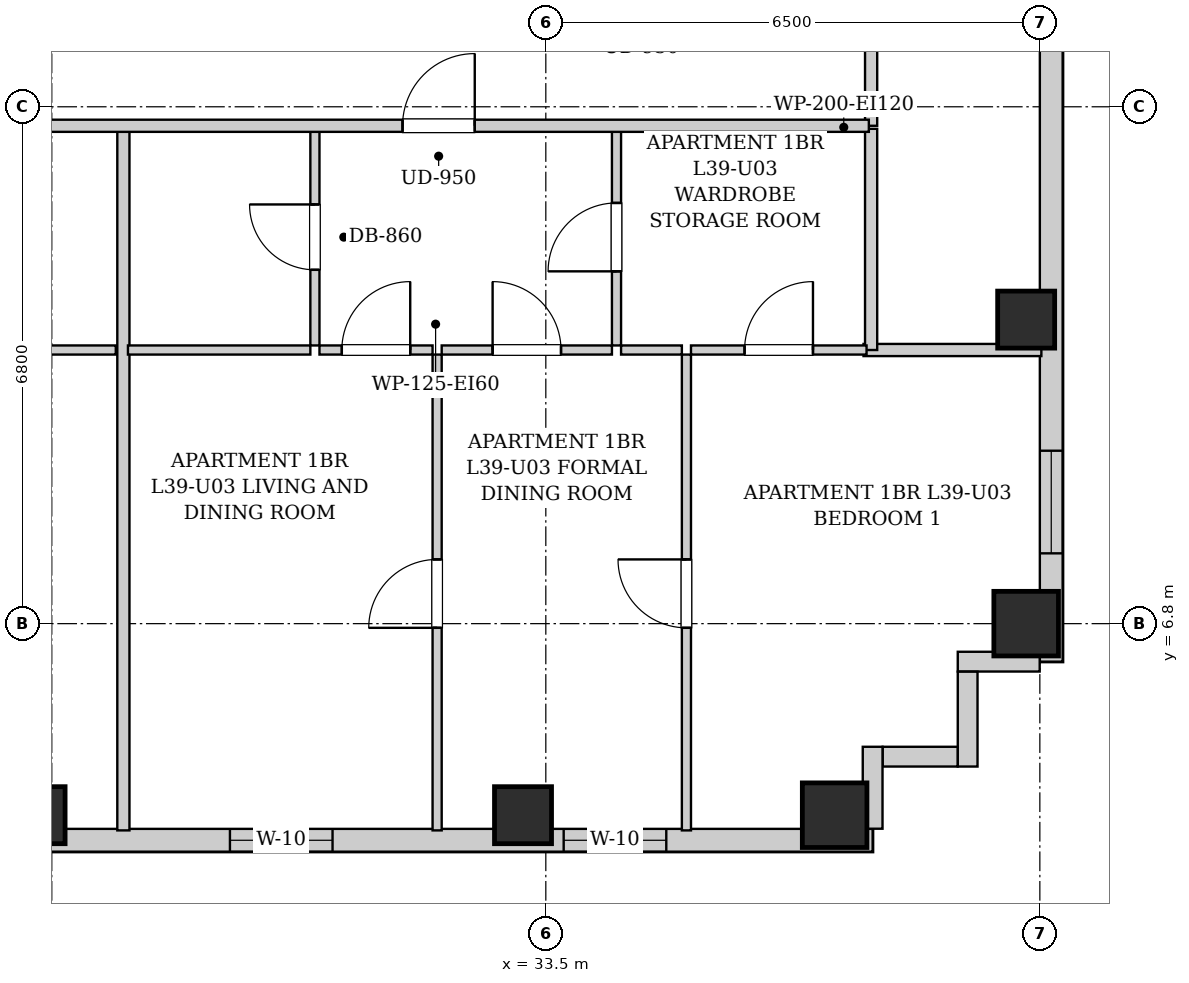
"""IFC4 building model, lengths in metres.
Left out: names, types, materials, properties, quantities, classifications, styles, units other than length and angle.
Written with IfcOpenShell. Run it as: python <this file> out.ifc"""

import sys

from ifc_helpers import new_model, si_unit, direction, frame, frame_2d, origin, origin_2d, place, context, subcontext, project, spatial, rectangle, extrude, element, fill, save


model = new_model("IFC4")
c1 = context("Model", 3, precision=1e-05, world=origin(), true_north=direction((0.0, 1.0)))
c2 = subcontext(c1, "Body", "Model", "MODEL_VIEW")
j1 = project(units=[si_unit("LENGTHUNIT", "METRE"), si_unit("PLANEANGLEUNIT", "RADIAN")], contexts=[c1])
p1 = place(None, origin())
s1 = spatial("IfcSite", under=j1, at=p1, CompositionType="ELEMENT")
p2 = place(p1, origin())
s2 = spatial("IfcBuilding", under=s1, at=p2, CompositionType="ELEMENT")
p3 = place(p2, frame((0.0, 0.0, 137.4)))
s3 = spatial("IfcBuildingStorey", under=s2, at=p3, CompositionType="ELEMENT", Elevation=137.4)
for number, where, z_axis, x_axis in (
    (1, (26.8, 4.28, 0.0), (0.0, 0.0, 1.0), (1.0, 0.0, 0.0)),
    (2, (33.2, 4.28, 0.0), (0.0, 0.0, 1.0), (1.0, 0.0, 0.0)),
):
    element("IfcColumn", number, at=place(p3, frame(where, z_axis=z_axis, x_axis=x_axis)), inside=s3, PredefinedType="COLUMN", context=c2, shape_type="SweptSolid", body=[
        extrude(rectangle(XDim=0.75, YDim=0.75, at=origin_2d()), origin(), (0.0, 0.0, 1.0), 3.25),
    ])
for number, where, z_axis, x_axis in (
    (3, (37.3, 4.28, 0.0), (0.0, 0.0, 1.0), (1.0, 0.0, 0.0)),
    (4, (39.82, 6.8, 0.0), (0.0, 0.0, 1.0), (1.0, 0.0, 0.0)),
):
    element("IfcColumn", number, at=place(p3, frame(where, z_axis=z_axis, x_axis=x_axis)), inside=s3, PredefinedType="COLUMN", context=c2, shape_type="SweptSolid", body=[
        extrude(rectangle(XDim=0.85, YDim=0.85, at=origin_2d()), origin(), (0.0, 0.0, 1.0), 3.25),
    ])
p4 = place(p3, frame((39.82, 10.8, 0.0), z_axis=(0.0, 0.0, 1.0), x_axis=(1.0, 0.0, 0.0)))
e5 = element("IfcColumn", 5, at=p4, inside=s3, PredefinedType="COLUMN", context=c2, shape_type="SweptSolid", body=[
    extrude(rectangle(XDim=0.75, YDim=0.75, at=origin_2d()), origin(), (0.0, 0.0, 1.0), 3.25),
])
p5 = place(p3, frame((40.15, 40.8, 0.0), z_axis=(0.0, 0.0, 1.0), x_axis=(0.0, -1.0, 0.0)))
e6 = element("IfcWall", 6, at=p5, inside=s3, PredefinedType="SOLIDWALL", context=c2, shape_type="SweptSolid", body=[
    extrude(rectangle(XDim=34.5, YDim=0.3, at=frame_2d((17.25, 0.0))), origin(), (0.0, 0.0, 1.0), 2.99),
])
p6 = place(p5, frame((31.725, 0.0, 0.55)))
e7 = element("IfcOpeningElement", 7, at=p6, cuts=e6, PredefinedType="OPENING", context=c2, shape_type="SweptSolid", body=[
    extrude(rectangle(XDim=1.35, YDim=1.2, at=frame_2d((0.675, 0.6))), frame((0.0, 0.16, 0.0), z_axis=(0.0, -1.0, 0.0), x_axis=(1.0, 0.0, 0.0)), (0.0, 0.0, 1.0), 0.32),
])
p7 = place(p5, frame((3.0, 0.0, 0.55)))
e8 = element("IfcOpeningElement", 8, at=p7, cuts=e6, PredefinedType="OPENING", context=c2, shape_type="SweptSolid", body=[
    extrude(rectangle(XDim=1.35, YDim=1.2, at=frame_2d((0.675, 0.6))), frame((0.0, 0.16, 0.0), z_axis=(0.0, -1.0, 0.0), x_axis=(1.0, 0.0, 0.0)), (0.0, 0.0, 1.0), 0.32),
])
p8 = place(p5, frame((1.085, 0.0, 0.55)))
e9 = element("IfcOpeningElement", 9, at=p8, cuts=e6, PredefinedType="OPENING", context=c2, shape_type="SweptSolid", body=[
    extrude(rectangle(XDim=1.35, YDim=1.2, at=frame_2d((0.675, 0.6))), frame((0.0, 0.16, 0.0), z_axis=(0.0, -1.0, 0.0), x_axis=(1.0, 0.0, 0.0)), (0.0, 0.0, 1.0), 0.32),
])
p9 = place(p5, frame((21.3, 0.0, 0.55)))
e10 = element("IfcOpeningElement", 10, at=p9, cuts=e6, PredefinedType="OPENING", context=c2, shape_type="SweptSolid", body=[
    extrude(rectangle(XDim=1.35, YDim=1.2, at=frame_2d((0.675, 0.6))), frame((0.0, 0.16, 0.0), z_axis=(0.0, -1.0, 0.0), x_axis=(1.0, 0.0, 0.0)), (0.0, 0.0, 1.0), 0.32),
])
p10 = place(p5, frame((22.91, 0.0, 0.55)))
e11 = element("IfcOpeningElement", 11, at=p10, cuts=e6, PredefinedType="OPENING", context=c2, shape_type="SweptSolid", body=[
    extrude(rectangle(XDim=1.35, YDim=1.2, at=frame_2d((0.675, 0.6))), frame((0.0, 0.16, 0.0), z_axis=(0.0, -1.0, 0.0), x_axis=(1.0, 0.0, 0.0)), (0.0, 0.0, 1.0), 0.32),
])
p11 = place(p5, frame((14.175, 0.0, 0.55)))
e12 = element("IfcOpeningElement", 12, at=p11, cuts=e6, PredefinedType="OPENING", context=c2, shape_type="SweptSolid", body=[
    extrude(rectangle(XDim=1.35, YDim=1.2, at=frame_2d((0.675, 0.6))), frame((0.0, 0.16, 0.0), z_axis=(0.0, -1.0, 0.0), x_axis=(1.0, 0.0, 0.0)), (0.0, 0.0, 1.0), 0.32),
])
p12 = place(p5, frame((12.335, 0.0, 0.55)))
e13 = element("IfcOpeningElement", 13, at=p12, cuts=e6, PredefinedType="OPENING", context=c2, shape_type="SweptSolid", body=[
    extrude(rectangle(XDim=1.35, YDim=1.2, at=frame_2d((0.675, 0.6))), frame((0.0, 0.16, 0.0), z_axis=(0.0, -1.0, 0.0), x_axis=(1.0, 0.0, 0.0)), (0.0, 0.0, 1.0), 0.32),
])
p13 = place(p3, frame((37.8, 3.95, 0.0), z_axis=(0.0, 0.0, 1.0), x_axis=(-1.0, 0.0, 0.0)))
e14 = element("IfcWall", 14, at=p13, inside=s3, PredefinedType="SOLIDWALL", context=c2, shape_type="SweptSolid", body=[
    extrude(rectangle(XDim=20.7, YDim=0.3, at=frame_2d((10.35, 0.0))), origin(), (0.0, 0.0, 1.0), 2.99),
])
p14 = place(p13, frame((17.305, 0.0, 0.55)))
e15 = element("IfcOpeningElement", 15, at=p14, cuts=e14, PredefinedType="OPENING", context=c2, shape_type="SweptSolid", body=[
    extrude(rectangle(XDim=1.35, YDim=1.2, at=frame_2d((0.675, 0.6))), frame((0.0, 0.16, 0.0), z_axis=(0.0, -1.0, 0.0), x_axis=(1.0, 0.0, 0.0)), (0.0, 0.0, 1.0), 0.32),
])
p15 = place(p13, frame((7.106, 0.0, 0.55)))
e16 = element("IfcOpeningElement", 16, at=p15, cuts=e14, PredefinedType="OPENING", context=c2, shape_type="SweptSolid", body=[
    extrude(rectangle(XDim=1.35, YDim=1.2, at=frame_2d((0.675, 0.6))), frame((0.0, 0.16, 0.0), z_axis=(0.0, -1.0, 0.0), x_axis=(1.0, 0.0, 0.0)), (0.0, 0.0, 1.0), 0.32),
])
p16 = place(p13, frame((2.715, 0.0, 0.55)))
e17 = element("IfcOpeningElement", 17, at=p16, cuts=e14, PredefinedType="OPENING", context=c2, shape_type="SweptSolid", body=[
    extrude(rectangle(XDim=1.35, YDim=1.2, at=frame_2d((0.675, 0.6))), frame((0.0, 0.16, 0.0), z_axis=(0.0, -1.0, 0.0), x_axis=(1.0, 0.0, 0.0)), (0.0, 0.0, 1.0), 0.32),
])
p17 = place(p3, frame((39.998, 6.3, 0.0), z_axis=(0.0, 0.0, 1.0), x_axis=(-1.0, 0.0, 0.0)))
e18 = element("IfcWall", 18, at=p17, inside=s3, PredefinedType="SOLIDWALL", context=c2, shape_type="SweptSolid", body=[
    extrude(rectangle(XDim=1.078, YDim=0.26, at=frame_2d((0.539, 0.0))), origin(), (0.0, 0.0, 1.0), 2.99),
])
p18 = place(p3, frame((39.05, 6.168, 0.0), z_axis=(0.0, 0.0, 1.0), x_axis=(0.0, -1.0, 0.0)))
e19 = element("IfcWall", 19, at=p18, inside=s3, PredefinedType="SOLIDWALL", context=c2, shape_type="SweptSolid", body=[
    extrude(rectangle(XDim=1.248, YDim=0.26, at=frame_2d((0.624, 0.0))), origin(), (0.0, 0.0, 1.0), 2.99),
])
p19 = place(p3, frame((38.918, 5.05, 0.0), z_axis=(0.0, 0.0, 1.0), x_axis=(-1.0, 0.0, 0.0)))
e20 = element("IfcWall", 20, at=p19, inside=s3, PredefinedType="SOLIDWALL", context=c2, shape_type="SweptSolid", body=[
    extrude(rectangle(XDim=0.986, YDim=0.26, at=frame_2d((0.493, 0.0))), origin(), (0.0, 0.0, 1.0), 2.99),
])
p20 = place(p3, frame((37.8, 5.18, 0.0), z_axis=(0.0, 0.0, 1.0), x_axis=(0.0, -1.0, 0.0)))
e21 = element("IfcWall", 21, at=p20, inside=s3, PredefinedType="SOLIDWALL", context=c2, shape_type="SweptSolid", body=[
    extrude(rectangle(XDim=1.078, YDim=0.26, at=frame_2d((0.539, 0.0))), origin(), (0.0, 0.0, 1.0), 2.99),
])
p21 = place(p3, frame((37.78, 13.35, 0.0), z_axis=(0.0, 0.0, 1.0), x_axis=(0.0, 1.0, 0.0)))
e22 = element("IfcWall", 22, at=p21, inside=s3, PredefinedType="PARTITIONING", context=c2, shape_type="SweptSolid", body=[
    extrude(rectangle(XDim=1.74, YDim=0.16, at=frame_2d((0.87, 0.0))), origin(), (0.0, 0.0, 1.0), 2.99),
])
p22 = place(p3, frame((23.938, 10.4, 0.0), z_axis=(0.0, 0.0, 1.0), x_axis=(1.0, 0.0, 0.0)))
e23 = element("IfcWall", 23, at=p22, inside=s3, PredefinedType="PARTITIONING", context=c2, shape_type="SweptSolid", body=[
    extrude(rectangle(XDim=3.904, YDim=0.12, at=frame_2d((1.952, 0.0))), origin(), (0.0, 0.0, 1.0), 2.99),
])
p23 = place(p22, frame((1.502, 0.0, 0.0)))
e24 = element("IfcOpeningElement", 24, at=p23, cuts=e23, PredefinedType="OPENING", context=c2, shape_type="SweptSolid", body=[
    extrude(rectangle(XDim=0.9, YDim=2.05, at=frame_2d((0.45, 1.025))), frame((0.0, 0.07, 0.0), z_axis=(0.0, -1.0, 0.0), x_axis=(1.0, 0.0, 0.0)), (0.0, 0.0, 1.0), 0.14),
])
p24 = place(p3, frame((37.68, 10.4, 0.0), z_axis=(0.0, 0.0, 1.0), x_axis=(1.0, 0.0, 0.0)))
e25 = element("IfcWall", 25, at=p24, inside=s3, PredefinedType="PARTITIONING", context=c2, shape_type="SweptSolid", body=[
    extrude(rectangle(XDim=2.34, YDim=0.16, at=frame_2d((1.17, 0.0))), origin(), (0.0, 0.0, 1.0), 2.99),
])
p25 = place(p3, frame((37.78, 10.4, 0.0), z_axis=(0.0, 0.0, 1.0), x_axis=(0.0, 1.0, 0.0)))
e26 = element("IfcWall", 26, at=p25, inside=s3, PredefinedType="PARTITIONING", context=c2, shape_type="SweptSolid", body=[
    extrude(rectangle(XDim=2.91, YDim=0.16, at=frame_2d((1.455, 0.0))), origin(), (0.0, 0.0, 1.0), 2.99),
])
p26 = place(p3, frame((27.942, 4.08, 0.0), z_axis=(0.0, 0.0, 1.0), x_axis=(0.0, 1.0, 0.0)))
e27 = element("IfcWall", 27, at=p26, inside=s3, PredefinedType="PARTITIONING", context=c2, shape_type="SweptSolid", body=[
    extrude(rectangle(XDim=9.23, YDim=0.16, at=frame_2d((4.615, 0.0))), origin(), (0.0, 0.0, 1.0), 2.99),
])
p27 = place(p3, frame((30.462, 10.46, 0.0), z_axis=(0.0, 0.0, 1.0), x_axis=(0.0, 1.0, 0.0)))
e28 = element("IfcWall", 28, at=p27, inside=s3, PredefinedType="PARTITIONING", context=c2, shape_type="SweptSolid", body=[
    extrude(rectangle(XDim=2.85, YDim=0.12, at=frame_2d((1.425, 0.0))), origin(), (0.0, 0.0, 1.0), 2.99),
])
p28 = place(p27, frame((0.995, 0.0, 0.0)))
e29 = element("IfcOpeningElement", 29, at=p28, cuts=e28, PredefinedType="OPENING", context=c2, shape_type="SweptSolid", body=[
    extrude(rectangle(XDim=0.86, YDim=2.05, at=frame_2d((0.43, 1.025))), frame((0.0, 0.07, 0.0), z_axis=(0.0, -1.0, 0.0), x_axis=(1.0, 0.0, 0.0)), (0.0, 0.0, 1.0), 0.14),
])
p29 = place(p3, frame((28.002, 10.4, 0.0), z_axis=(0.0, 0.0, 1.0), x_axis=(1.0, 0.0, 0.0)))
e30 = element("IfcWall", 30, at=p29, inside=s3, PredefinedType="PARTITIONING", context=c2, shape_type="SweptSolid", body=[
    extrude(rectangle(XDim=2.4, YDim=0.12, at=frame_2d((1.2, 0.0))), origin(), (0.0, 0.0, 1.0), 2.99),
])
p30 = place(p3, frame((34.43, 10.46, 0.0), z_axis=(0.0, 0.0, 1.0), x_axis=(0.0, 1.0, 0.0)))
e31 = element("IfcWall", 31, at=p30, inside=s3, PredefinedType="PARTITIONING", context=c2, shape_type="SweptSolid", body=[
    extrude(rectangle(XDim=2.85, YDim=0.12, at=frame_2d((1.425, 0.0))), origin(), (0.0, 0.0, 1.0), 2.99),
])
p31 = place(p30, frame((0.975, 0.0, 0.0)))
e32 = element("IfcOpeningElement", 32, at=p31, cuts=e31, PredefinedType="OPENING", context=c2, shape_type="SweptSolid", body=[
    extrude(rectangle(XDim=0.9, YDim=2.05, at=frame_2d((0.45, 1.025))), frame((0.0, 0.07, 0.0), z_axis=(0.0, -1.0, 0.0), x_axis=(1.0, 0.0, 0.0)), (0.0, 0.0, 1.0), 0.14),
])
p32 = place(p3, frame((30.522, 10.4, 0.0), z_axis=(0.0, 0.0, 1.0), x_axis=(1.0, 0.0, 0.0)))
e33 = element("IfcWall", 33, at=p32, inside=s3, PredefinedType="PARTITIONING", context=c2, shape_type="SweptSolid", body=[
    extrude(rectangle(XDim=1.488, YDim=0.12, at=frame_2d((0.744, 0.0))), origin(), (0.0, 0.0, 1.0), 2.99),
])
p33 = place(p32, frame((0.294, 0.0, 0.0)))
e34 = element("IfcOpeningElement", 34, at=p33, cuts=e33, PredefinedType="OPENING", context=c2, shape_type="SweptSolid", body=[
    extrude(rectangle(XDim=0.9, YDim=2.05, at=frame_2d((0.45, 1.025))), frame((0.0, 0.07, 0.0), z_axis=(0.0, -1.0, 0.0), x_axis=(1.0, 0.0, 0.0)), (0.0, 0.0, 1.0), 0.14),
])
p34 = place(p3, frame((32.13, 10.4, 0.0), z_axis=(0.0, 0.0, 1.0), x_axis=(1.0, 0.0, 0.0)))
e35 = element("IfcWall", 35, at=p34, inside=s3, PredefinedType="PARTITIONING", context=c2, shape_type="SweptSolid", body=[
    extrude(rectangle(XDim=2.24, YDim=0.12, at=frame_2d((1.12, 0.0))), origin(), (0.0, 0.0, 1.0), 2.99),
])
p35 = place(p34, frame((0.67, 0.0, 0.0)))
e36 = element("IfcOpeningElement", 36, at=p35, cuts=e35, PredefinedType="OPENING", context=c2, shape_type="SweptSolid", body=[
    extrude(rectangle(XDim=0.9, YDim=2.05, at=frame_2d((0.45, 1.025))), frame((0.0, 0.07, 0.0), z_axis=(0.0, -1.0, 0.0), x_axis=(1.0, 0.0, 0.0)), (0.0, 0.0, 1.0), 0.14),
])
p36 = place(p3, frame((34.49, 10.4, 0.0), z_axis=(0.0, 0.0, 1.0), x_axis=(1.0, 0.0, 0.0)))
e37 = element("IfcWall", 37, at=p36, inside=s3, PredefinedType="PARTITIONING", context=c2, shape_type="SweptSolid", body=[
    extrude(rectangle(XDim=0.8, YDim=0.12, at=frame_2d((0.4, 0.0))), origin(), (0.0, 0.0, 1.0), 2.99),
])
p37 = place(p3, frame((35.41, 10.4, 0.0), z_axis=(0.0, 0.0, 1.0), x_axis=(1.0, 0.0, 0.0)))
e38 = element("IfcWall", 38, at=p37, inside=s3, PredefinedType="PARTITIONING", context=c2, shape_type="SweptSolid", body=[
    extrude(rectangle(XDim=2.31, YDim=0.12, at=frame_2d((1.155, 0.0))), origin(), (0.0, 0.0, 1.0), 2.99),
])
p38 = place(p37, frame((0.705, 0.0, 0.0)))
e39 = element("IfcOpeningElement", 39, at=p38, cuts=e38, PredefinedType="OPENING", context=c2, shape_type="SweptSolid", body=[
    extrude(rectangle(XDim=0.9, YDim=2.05, at=frame_2d((0.45, 1.025))), frame((0.0, 0.07, 0.0), z_axis=(0.0, -1.0, 0.0), x_axis=(1.0, 0.0, 0.0)), (0.0, 0.0, 1.0), 0.14),
])
p39 = place(p3, frame((32.07, 4.08, 0.0), z_axis=(0.0, 0.0, 1.0), x_axis=(0.0, 1.0, 0.0)))
e40 = element("IfcWall", 40, at=p39, inside=s3, PredefinedType="PARTITIONING", context=c2, shape_type="SweptSolid", body=[
    extrude(rectangle(XDim=6.26, YDim=0.12, at=frame_2d((3.13, 0.0))), origin(), (0.0, 0.0, 1.0), 2.99),
])
p40 = place(p39, frame((2.665, 0.0, 0.0)))
e41 = element("IfcOpeningElement", 41, at=p40, cuts=e40, PredefinedType="OPENING", context=c2, shape_type="SweptSolid", body=[
    extrude(rectangle(XDim=0.9, YDim=2.05, at=frame_2d((0.45, 1.025))), frame((0.0, 0.07, 0.0), z_axis=(0.0, -1.0, 0.0), x_axis=(1.0, 0.0, 0.0)), (0.0, 0.0, 1.0), 0.14),
])
p41 = place(p3, frame((35.35, 4.08, 0.0), z_axis=(0.0, 0.0, 1.0), x_axis=(0.0, 1.0, 0.0)))
e42 = element("IfcWall", 42, at=p41, inside=s3, PredefinedType="PARTITIONING", context=c2, shape_type="SweptSolid", body=[
    extrude(rectangle(XDim=6.26, YDim=0.12, at=frame_2d((3.13, 0.0))), origin(), (0.0, 0.0, 1.0), 2.99),
])
p42 = place(p41, frame((2.665, 0.0, 0.0)))
e43 = element("IfcOpeningElement", 43, at=p42, cuts=e42, PredefinedType="OPENING", context=c2, shape_type="SweptSolid", body=[
    extrude(rectangle(XDim=0.9, YDim=2.05, at=frame_2d((0.45, 1.025))), frame((0.0, 0.07, 0.0), z_axis=(0.0, -1.0, 0.0), x_axis=(1.0, 0.0, 0.0)), (0.0, 0.0, 1.0), 0.14),
])
p43 = place(p3, frame((10.05, 13.35, 0.0), z_axis=(0.0, 0.0, 1.0), x_axis=(1.0, 0.0, 0.0)))
e44 = element("IfcWall", 44, at=p43, inside=s3, PredefinedType="PARTITIONING", context=c2, shape_type="SweptSolid", body=[
    extrude(rectangle(XDim=27.7, YDim=0.16, at=frame_2d((13.85, 0.0))), origin(), (0.0, 0.0, 1.0), 2.99),
])
p44 = place(p43, frame((5.365, 0.0, 0.0)))
e45 = element("IfcOpeningElement", 45, at=p44, cuts=e44, PredefinedType="OPENING", context=c2, shape_type="SweptSolid", body=[
    extrude(rectangle(XDim=0.95, YDim=2.1, at=frame_2d((0.475, 1.05))), frame((0.0, 0.09, 0.0), z_axis=(0.0, -1.0, 0.0), x_axis=(1.0, 0.0, 0.0)), (0.0, 0.0, 1.0), 0.18),
])
p45 = place(p43, frame((15.365, 0.0, 0.0)))
e46 = element("IfcOpeningElement", 46, at=p45, cuts=e44, PredefinedType="OPENING", context=c2, shape_type="SweptSolid", body=[
    extrude(rectangle(XDim=0.95, YDim=2.1, at=frame_2d((0.475, 1.05))), frame((0.0, 0.09, 0.0), z_axis=(0.0, -1.0, 0.0), x_axis=(1.0, 0.0, 0.0)), (0.0, 0.0, 1.0), 0.18),
])
p46 = place(p43, frame((21.565, 0.0, 0.0)))
e47 = element("IfcOpeningElement", 47, at=p46, cuts=e44, PredefinedType="OPENING", context=c2, shape_type="SweptSolid", body=[
    extrude(rectangle(XDim=0.95, YDim=2.1, at=frame_2d((0.475, 1.05))), frame((0.0, 0.09, 0.0), z_axis=(0.0, -1.0, 0.0), x_axis=(1.0, 0.0, 0.0)), (0.0, 0.0, 1.0), 0.18),
])
p47 = place(p28, origin())
e48 = element("IfcDoor", 48, at=p47, inside=s3, OperationType="SINGLE_SWING_RIGHT", PredefinedType="DOOR", context=c2, shape_type="SweptSolid", body=[
    extrude(rectangle(XDim=0.86, YDim=2.05, at=frame_2d((0.43, 1.025))), frame((0.0, 0.025, 0.0), z_axis=(0.0, -1.0, 0.0), x_axis=(1.0, 0.0, 0.0)), (0.0, 0.0, 1.0), 0.05),
])
fill(e29, e48)
p48 = place(p31, origin())
e49 = element("IfcDoor", 49, at=p48, inside=s3, OperationType="SINGLE_SWING_LEFT", PredefinedType="DOOR", context=c2, shape_type="SweptSolid", body=[
    extrude(rectangle(XDim=0.9, YDim=2.05, at=frame_2d((0.45, 1.025))), frame((0.0, 0.025, 0.0), z_axis=(0.0, -1.0, 0.0), x_axis=(1.0, 0.0, 0.0)), (0.0, 0.0, 1.0), 0.05),
])
fill(e32, e49)
p49 = place(p33, origin())
e50 = element("IfcDoor", 50, at=p49, inside=s3, OperationType="SINGLE_SWING_RIGHT", PredefinedType="DOOR", context=c2, shape_type="SweptSolid", body=[
    extrude(rectangle(XDim=0.9, YDim=2.05, at=frame_2d((0.45, 1.025))), frame((0.0, 0.025, 0.0), z_axis=(0.0, -1.0, 0.0), x_axis=(1.0, 0.0, 0.0)), (0.0, 0.0, 1.0), 0.05),
])
fill(e34, e50)
p50 = place(p35, origin())
e51 = element("IfcDoor", 51, at=p50, inside=s3, OperationType="SINGLE_SWING_LEFT", PredefinedType="DOOR", context=c2, shape_type="SweptSolid", body=[
    extrude(rectangle(XDim=0.9, YDim=2.05, at=frame_2d((0.45, 1.025))), frame((0.0, 0.025, 0.0), z_axis=(0.0, -1.0, 0.0), x_axis=(1.0, 0.0, 0.0)), (0.0, 0.0, 1.0), 0.05),
])
fill(e36, e51)
p51 = place(p38, origin())
e52 = element("IfcDoor", 52, at=p51, inside=s3, OperationType="SINGLE_SWING_RIGHT", PredefinedType="DOOR", context=c2, shape_type="SweptSolid", body=[
    extrude(rectangle(XDim=0.9, YDim=2.05, at=frame_2d((0.45, 1.025))), frame((0.0, 0.025, 0.0), z_axis=(0.0, -1.0, 0.0), x_axis=(1.0, 0.0, 0.0)), (0.0, 0.0, 1.0), 0.05),
])
fill(e39, e52)
p52 = place(p40, origin())
e53 = element("IfcDoor", 53, at=p52, inside=s3, OperationType="SINGLE_SWING_LEFT", PredefinedType="DOOR", context=c2, shape_type="SweptSolid", body=[
    extrude(rectangle(XDim=0.9, YDim=2.05, at=frame_2d((0.45, 1.025))), frame((0.0, 0.025, 0.0), z_axis=(0.0, -1.0, 0.0), x_axis=(1.0, 0.0, 0.0)), (0.0, 0.0, 1.0), 0.05),
])
fill(e41, e53)
p53 = place(p42, origin())
e54 = element("IfcDoor", 54, at=p53, inside=s3, OperationType="SINGLE_SWING_RIGHT", PredefinedType="DOOR", context=c2, shape_type="SweptSolid", body=[
    extrude(rectangle(XDim=0.9, YDim=2.05, at=frame_2d((0.45, 1.025))), frame((0.0, 0.025, 0.0), z_axis=(0.0, -1.0, 0.0), x_axis=(1.0, 0.0, 0.0)), (0.0, 0.0, 1.0), 0.05),
])
fill(e43, e54)
p54 = place(p46, origin())
e55 = element("IfcDoor", 55, at=p54, inside=s3, OperationType="SINGLE_SWING_RIGHT", PredefinedType="DOOR", context=c2, shape_type="SweptSolid", body=[
    extrude(rectangle(XDim=0.95, YDim=2.1, at=frame_2d((0.475, 1.05))), frame((0.0, 0.025, 0.0), z_axis=(0.0, -1.0, 0.0), x_axis=(1.0, 0.0, 0.0)), (0.0, 0.0, 1.0), 0.05),
])
fill(e47, e55)
p55 = place(p15, origin())
e56 = element("IfcWindow", 56, at=p55, inside=s3, PartitioningType="SINGLE_PANEL", PredefinedType="WINDOW", context=c2, shape_type="SweptSolid", body=[
    extrude(rectangle(XDim=1.35, YDim=1.2, at=frame_2d((0.675, 0.6))), frame((0.0, 0.03, 0.0), z_axis=(0.0, -1.0, 0.0), x_axis=(1.0, 0.0, 0.0)), (0.0, 0.0, 1.0), 0.06),
])
fill(e16, e56)
p56 = place(p16, origin())
e57 = element("IfcWindow", 57, at=p56, inside=s3, PartitioningType="SINGLE_PANEL", PredefinedType="WINDOW", context=c2, shape_type="SweptSolid", body=[
    extrude(rectangle(XDim=1.35, YDim=1.2, at=frame_2d((0.675, 0.6))), frame((0.0, 0.03, 0.0), z_axis=(0.0, -1.0, 0.0), x_axis=(1.0, 0.0, 0.0)), (0.0, 0.0, 1.0), 0.06),
])
fill(e17, e57)
p57 = place(p6, origin())
e58 = element("IfcWindow", 58, at=p57, inside=s3, PartitioningType="SINGLE_PANEL", PredefinedType="WINDOW", context=c2, shape_type="SweptSolid", body=[
    extrude(rectangle(XDim=1.35, YDim=1.2, at=frame_2d((0.675, 0.6))), frame((0.0, 0.03, 0.0), z_axis=(0.0, -1.0, 0.0), x_axis=(1.0, 0.0, 0.0)), (0.0, 0.0, 1.0), 0.06),
])
fill(e7, e58)
save(model, sys.argv[1])
